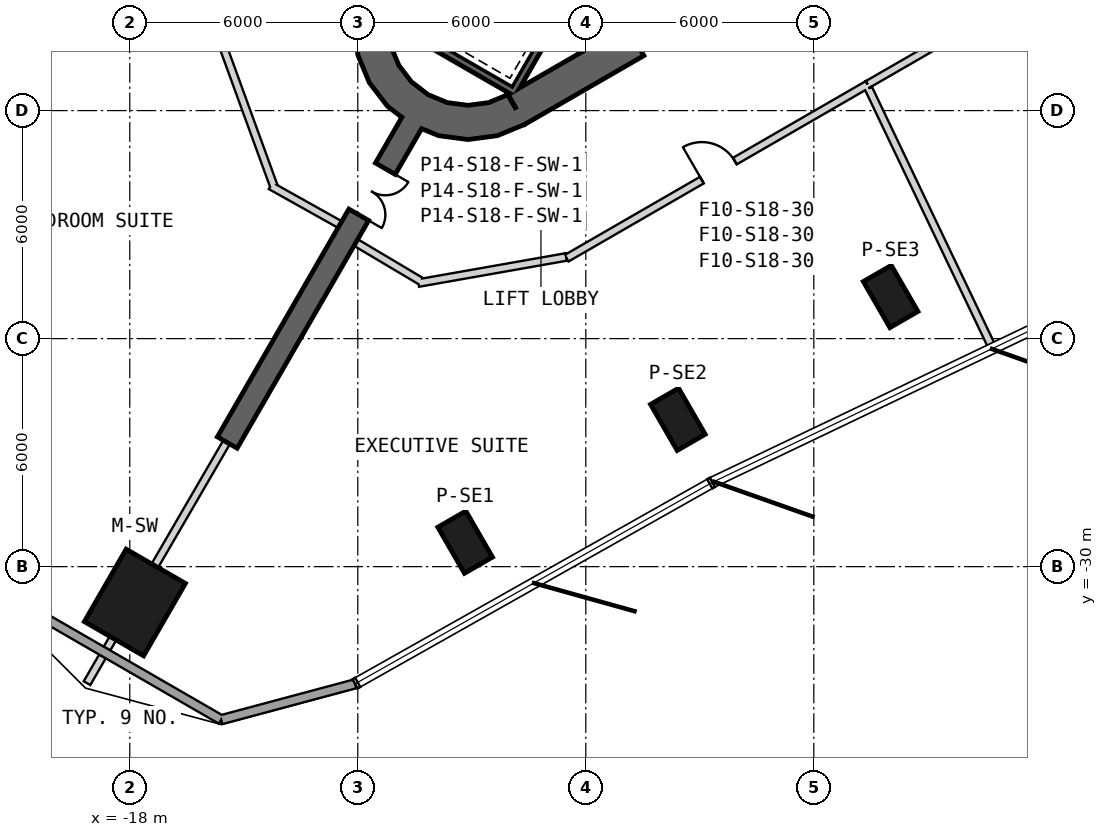
"""IFC4 building model, lengths in metres.
Left out: names, types, materials, properties, quantities, classifications, styles, units other than length and angle.
Written with IfcOpenShell. Run it as: python <this file> out.ifc"""

import sys

from ifc_helpers import new_model, si_unit, direction, frame, frame_2d, origin, origin_2d, place, context, subcontext, project, spatial, polyline, rectangle, outline, extrude, element, fill, save


model = new_model("IFC4")
c1 = context("Model", 3, precision=1e-05, world=origin(), true_north=direction((0.0, 1.0)))
c2 = subcontext(c1, "Body", "Model", "MODEL_VIEW")
j1 = project(units=[si_unit("LENGTHUNIT", "METRE"), si_unit("PLANEANGLEUNIT", "RADIAN")], contexts=[c1])
p1 = place(None, origin())
s1 = spatial("IfcSite", under=j1, at=p1, CompositionType="ELEMENT")
p2 = place(p1, origin())
s2 = spatial("IfcBuilding", under=s1, at=p2, CompositionType="ELEMENT")
p3 = place(p2, frame((0.0, 0.0, 298.7)))
s3 = spatial("IfcBuildingStorey", under=s2, at=p3, CompositionType="ELEMENT", Elevation=298.7)
p4 = place(p3, frame((-17.865, -30.944, 0.0), z_axis=(0.0, 0.0, 1.0), x_axis=(-0.5, -0.866025403784, 0.0)))
e1 = element("IfcColumn", 1, at=p4, inside=s3, PredefinedType="COLUMN", context=c2, shape_type="SweptSolid", body=[
    extrude(rectangle(XDim=2.2, YDim=1.8, at=origin_2d()), origin(), (0.0, 0.0, 1.0), 3.9),
])
for number, where, z_axis, x_axis in (
    (2, (-9.175, -29.356, -0.3), (0.0, 0.0, 1.0), (0.5, -0.866, 0.0)),
    (3, (-3.577, -26.124, -0.3), (0.0, 0.0, 1.0), (0.5, -0.866, 0.0)),
    (4, (2.021, -22.892, -0.3), (0.0, 0.0, 1.0), (0.5, -0.866, 0.0)),
):
    element("IfcColumn", number, at=place(p3, frame(where, z_axis=z_axis, x_axis=x_axis)), inside=s3, PredefinedType="COLUMN", context=c2, shape_type="SweptSolid", body=[
        extrude(rectangle(XDim=1.4, YDim=0.85, at=origin_2d()), origin(), (0.0, 0.0, 1.0), 4.2),
    ])
p5 = place(p3, frame((-7.825, -17.97, 0.0), z_axis=(0.0, 0.0, 1.0), x_axis=(0.866028369851, 0.499994862586, 0.0)))
e5 = element("IfcWall", 5, at=p5, inside=s3, PredefinedType="SHEAR", context=c2, shape_type="SweptSolid", body=[
    extrude(rectangle(XDim=31.523, YDim=0.9, at=frame_2d((15.762, 0.0))), origin(), (0.0, 0.0, 1.0), 3.9),
])
p6 = place(p5, frame((17.862, 0.0, 0.0)))
e6 = element("IfcOpeningElement", 6, at=p6, cuts=e5, PredefinedType="OPENING", context=c2, shape_type="SweptSolid", body=[
    extrude(rectangle(XDim=1.2, YDim=2.4, at=frame_2d((0.6, 1.2))), frame((0.0, 0.46, 0.0), z_axis=(0.0, -1.0, 0.0), x_axis=(1.0, 0.0, 0.0)), (0.0, 0.0, 1.0), 0.92),
])
p7 = place(p5, frame((20.562, 0.0, 0.0)))
e7 = element("IfcOpeningElement", 7, at=p7, cuts=e5, PredefinedType="OPENING", context=c2, shape_type="SweptSolid", body=[
    extrude(rectangle(XDim=1.2, YDim=2.4, at=frame_2d((0.6, 1.2))), frame((0.0, 0.46, 0.0), z_axis=(0.0, -1.0, 0.0), x_axis=(1.0, 0.0, 0.0)), (0.0, 0.0, 1.0), 0.92),
])
p8 = place(p5, frame((26.712, 0.0, 0.0)))
e8 = element("IfcOpeningElement", 8, at=p8, cuts=e5, PredefinedType="OPENING", context=c2, shape_type="SweptSolid", body=[
    extrude(rectangle(XDim=1.2, YDim=2.4, at=frame_2d((0.6, 1.2))), frame((0.0, 0.46, 0.0), z_axis=(0.0, -1.0, 0.0), x_axis=(1.0, 0.0, 0.0)), (0.0, 0.0, 1.0), 0.92),
])
p9 = place(p5, frame((3.612, 0.0, 0.0)))
e9 = element("IfcOpeningElement", 9, at=p9, cuts=e5, PredefinedType="OPENING", context=c2, shape_type="SweptSolid", body=[
    extrude(rectangle(XDim=1.2, YDim=2.4, at=frame_2d((0.6, 1.2))), frame((0.0, 0.46, 0.0), z_axis=(0.0, -1.0, 0.0), x_axis=(1.0, 0.0, 0.0)), (0.0, 0.0, 1.0), 0.92),
])
p10 = place(p3, origin())
e10 = element("IfcWall", 10, at=p10, inside=s3, PredefinedType="SHEAR", context=c2, shape_type="SweptSolid", body=[
    extrude(outline(polyline([(-12.1, -15.762), (-11.998, -16.538), (-11.698, -17.262), (-11.221, -17.883), (-10.6, -18.36), (-9.876, -18.659), (-9.1, -18.762), (-8.323, -18.659), (-7.6, -18.36), (-8.05, -17.58), (-8.556, -17.79), (-9.1, -17.862), (-9.644, -17.79), (-10.15, -17.58), (-10.585, -17.247), (-10.919, -16.812), (-11.128, -16.305), (-11.2, -15.762), (-12.1, -15.762)])), origin(), (0.0, 0.0, 1.0), 3.9),
])
p11 = place(p3, frame((-10.575, -18.316, 0.0), z_axis=(0.0, 0.0, 1.0), x_axis=(-0.499999297704, -0.866025809255, 0.0)))
e11 = element("IfcWall", 11, at=p11, inside=s3, PredefinedType="SHEAR", context=c2, shape_type="SweptSolid", body=[
    extrude(rectangle(XDim=9.72, YDim=0.6, at=frame_2d((4.86, 0.0))), origin(), (0.0, 0.0, 1.0), 3.9),
])
p12 = place(p11, frame((1.4, 0.0, 0.0)))
e12 = element("IfcOpeningElement", 12, at=p12, cuts=e11, PredefinedType="OPENING", context=c2, shape_type="SweptSolid", body=[
    extrude(rectangle(XDim=1.4, YDim=2.4, at=frame_2d((0.7, 1.2))), frame((0.0, 0.31, 0.0), z_axis=(0.0, -1.0, 0.0), x_axis=(1.0, 0.0, 0.0)), (0.0, 0.0, 1.0), 0.62),
])
p13 = place(p3, frame((-21.671, -30.52, 0.0), z_axis=(0.0, 0.0, 1.0), x_axis=(0.866026812589, -0.499997559872, 0.0)))
e13 = element("IfcWall", 13, at=p13, inside=s3, PredefinedType="SOLIDWALL", context=c2, shape_type="SweptSolid", body=[
    extrude(rectangle(XDim=7.016, YDim=0.24, at=frame_2d((3.508, 0.0))), origin(), (0.0, 0.0, 1.0), 3.6),
])
p14 = place(p3, frame((-15.595, -34.028, 0.0), z_axis=(0.0, 0.0, 1.0), x_axis=(0.965927742293, 0.258811894374, 0.0)))
e14 = element("IfcWall", 14, at=p14, inside=s3, PredefinedType="SOLIDWALL", context=c2, shape_type="SweptSolid", body=[
    extrude(rectangle(XDim=3.649, YDim=0.24, at=frame_2d((1.824, 0.0))), origin(), (0.0, 0.0, 1.0), 3.6),
])
p15 = place(p3, frame((-3.905, -10.563, -0.3), z_axis=(0.0, 0.0, 1.0), x_axis=(-0.500012932018, -0.866017937352, 0.0)))
e15 = element("IfcWall", 15, at=p15, inside=s3, PredefinedType="SHEAR", context=c2, shape_type="SweptSolid", body=[
    extrude(rectangle(XDim=8.1, YDim=0.2, at=frame_2d((4.05, 0.0))), origin(), (0.0, 0.0, 1.0), 3.9),
])
p16 = place(p3, frame((-11.282, -15.541, -0.3), z_axis=(0.0, 0.0, 1.0), x_axis=(0.866000483506, -0.500043160704, 0.0)))
e16 = element("IfcWall", 16, at=p16, inside=s3, PredefinedType="SHEAR", context=c2, shape_type="SweptSolid", body=[
    extrude(rectangle(XDim=3.8, YDim=0.2, at=frame_2d((1.9, 0.0))), origin(), (0.0, 0.0, 1.0), 3.9),
])
p17 = place(p3, frame((-14.293, -19.978, 0.0), z_axis=(0.0, 0.0, 1.0), x_axis=(0.872510000486, -0.48859625362, 0.0)))
e17 = element("IfcWall", 17, at=p17, inside=s3, PredefinedType="PARTITIONING", context=c2, shape_type="SweptSolid", body=[
    extrude(rectangle(XDim=2.09, YDim=0.2, at=frame_2d((1.045, 0.0))), origin(), (0.0, 0.0, 1.0), 3.6),
])
p18 = place(p3, frame((-15.534, -16.346, 0.0), z_axis=(0.0, 0.0, 1.0), x_axis=(0.342001008711, -0.939699584996, 0.0)))
e18 = element("IfcWall", 18, at=p18, inside=s3, PredefinedType="PARTITIONING", context=c2, shape_type="SweptSolid", body=[
    extrude(rectangle(XDim=3.875, YDim=0.2, at=frame_2d((1.938, 0.0))), origin(), (0.0, 0.0, 1.0), 2.88),
])
p19 = place(p3, frame((-6.505, -21.885, 0.0), z_axis=(0.0, 0.0, 1.0), x_axis=(0.866029997737, 0.499992042957, 0.0)))
e19 = element("IfcWall", 19, at=p19, inside=s3, PredefinedType="PARTITIONING", context=c2, shape_type="SweptSolid", body=[
    extrude(rectangle(XDim=9.146, YDim=0.2, at=frame_2d((4.573, 0.0))), origin(), (0.0, 0.0, 1.0), 2.88),
])
p20 = place(p19, frame((4.111, 0.0, 0.0)))
e20 = element("IfcOpeningElement", 20, at=p20, cuts=e19, PredefinedType="OPENING", context=c2, shape_type="SweptSolid", body=[
    extrude(rectangle(XDim=1.0, YDim=2.1, at=frame_2d((0.5, 1.05))), frame((0.0, 0.11, 0.0), z_axis=(0.0, -1.0, 0.0), x_axis=(1.0, 0.0, 0.0)), (0.0, 0.0, 1.0), 0.22),
])
p21 = place(p3, frame((1.415, -17.312, 0.0), z_axis=(0.0, 0.0, 1.0), x_axis=(0.866022488339, 0.500005049665, 0.0)))
e21 = element("IfcWall", 21, at=p21, inside=s3, PredefinedType="PARTITIONING", context=c2, shape_type="SweptSolid", body=[
    extrude(rectangle(XDim=23.806, YDim=0.2, at=frame_2d((11.903, 0.0))), origin(), (0.0, 0.0, 1.0), 2.88),
])
p22 = place(p21, frame((11.403, 0.0, 0.0)))
e22 = element("IfcOpeningElement", 22, at=p22, cuts=e21, PredefinedType="OPENING", context=c2, shape_type="SweptSolid", body=[
    extrude(rectangle(XDim=1.0, YDim=2.1, at=frame_2d((0.5, 1.05))), frame((0.0, 0.11, 0.0), z_axis=(0.0, -1.0, 0.0), x_axis=(1.0, 0.0, 0.0)), (0.0, 0.0, 1.0), 0.22),
])
p23 = place(p3, frame((-10.406, -22.538, 0.0), z_axis=(0.0, 0.0, 1.0), x_axis=(0.98480284819, 0.173675991999, 0.0)))
e23 = element("IfcWall", 23, at=p23, inside=s3, PredefinedType="PARTITIONING", context=c2, shape_type="SweptSolid", body=[
    extrude(rectangle(XDim=3.949, YDim=0.2, at=frame_2d((1.974, 0.0))), origin(), (0.0, 0.0, 1.0), 2.88),
])
p24 = place(p3, frame((-12.05, -21.472, 0.0), z_axis=(0.0, 0.0, 1.0), x_axis=(0.859577966481, -0.511004617924, 0.0)))
e24 = element("IfcWall", 24, at=p24, inside=s3, PredefinedType="PARTITIONING", context=c2, shape_type="SweptSolid", body=[
    extrude(rectangle(XDim=1.998, YDim=0.2, at=frame_2d((0.999, 0.0))), origin(), (0.0, 0.0, 1.0), 3.6),
])
p25 = place(p3, frame((-19.125, -33.066, 0.0), z_axis=(0.0, 0.0, 1.0), x_axis=(0.500052144805, 0.865995295874, 0.0)))
e25 = element("IfcWall", 25, at=p25, inside=s3, PredefinedType="PARTITIONING", context=c2, shape_type="SweptSolid", body=[
    extrude(rectangle(XDim=0.812, YDim=0.2, at=frame_2d((0.406, 0.0))), origin(), (0.0, 0.0, 1.0), 3.6),
])
p26 = place(p3, frame((-18.599, -32.155, 0.0), z_axis=(0.0, 0.0, 1.0), x_axis=(0.500213193091, 0.865902281703, 0.0)))
e26 = element("IfcWall", 26, at=p26, inside=s3, PredefinedType="PARTITIONING", context=c2, shape_type="SweptSolid", body=[
    extrude(rectangle(XDim=0.316, YDim=0.2, at=frame_2d((0.158, 0.0))), origin(), (0.0, 0.0, 1.0), 3.6),
])
p27 = place(p3, frame((-17.341, -29.976, 0.0), z_axis=(0.0, 0.0, 1.0), x_axis=(0.50255049681, 0.864547857644, 0.0)))
e27 = element("IfcWall", 27, at=p27, inside=s3, PredefinedType="PARTITIONING", context=c2, shape_type="SweptSolid", body=[
    extrude(rectangle(XDim=3.76, YDim=0.2, at=frame_2d((1.88, 0.0))), origin(), (0.0, 0.0, 1.0), 3.17),
])
p28 = place(p3, frame((1.438, -17.414, 0.0), z_axis=(0.0, 0.0, 1.0), x_axis=(0.431072758101, -0.902317171079, 0.0)))
e28 = element("IfcWall", 28, at=p28, inside=s3, PredefinedType="PARTITIONING", context=c2, shape_type="SweptSolid", body=[
    extrude(rectangle(XDim=7.585, YDim=0.2, at=frame_2d((3.792, 0.0))), origin(), (0.0, 0.0, 1.0), 2.97),
])
p29 = place(p20, origin())
e29 = element("IfcDoor", 29, at=p29, inside=s3, OperationType="SINGLE_SWING_LEFT", PredefinedType="USERDEFINED", context=c2, shape_type="SweptSolid", body=[
    extrude(rectangle(XDim=1.0, YDim=2.1, at=frame_2d((0.5, 1.05))), frame((0.0, 0.025, 0.0), z_axis=(0.0, -1.0, 0.0), x_axis=(1.0, 0.0, 0.0)), (0.0, 0.0, 1.0), 0.05),
])
fill(e20, e29)
p30 = place(p12, origin())
e30 = element("IfcDoor", 30, at=p30, inside=s3, OperationType="DOUBLE_DOOR_SINGLE_SWING", PredefinedType="NOTDEFINED", context=c2, shape_type="SweptSolid", body=[
    extrude(rectangle(XDim=1.4, YDim=2.4, at=frame_2d((0.7, 1.2))), frame((0.0, 0.025, 0.0), z_axis=(0.0, -1.0, 0.0), x_axis=(1.0, 0.0, 0.0)), (0.0, 0.0, 1.0), 0.05),
])
fill(e12, e30)
save(model, sys.argv[1])
